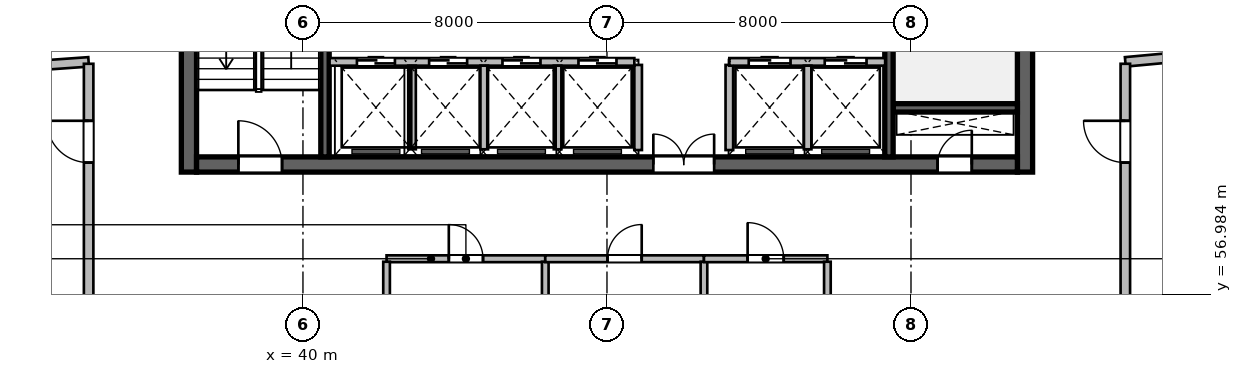
"""IFC4 building model, lengths in metres.
Left out: names, types, materials, properties, quantities, classifications, styles, units other than length and angle.
Written with IfcOpenShell. Run it as: python <this file> out.ifc"""

import sys

from ifc_helpers import new_model, si_unit, direction, frame, frame_2d, origin, place, context, subcontext, project, spatial, rectangle, extrude, source, transform, mapped, element, fill, save


model = new_model("IFC4")
c1 = context("Model", 3, precision=1e-05, world=origin(), true_north=direction((0.0, 1.0)))
c2 = subcontext(c1, "Body", "Model", "MODEL_VIEW")
j1 = project(units=[si_unit("LENGTHUNIT", "METRE"), si_unit("PLANEANGLEUNIT", "RADIAN")], contexts=[c1])
p1 = place(None, origin())
s1 = spatial("IfcSite", under=j1, at=p1, CompositionType="ELEMENT")
p2 = place(p1, origin())
s2 = spatial("IfcBuilding", under=s1, at=p2, CompositionType="ELEMENT")
p3 = place(p2, frame((0.0, 0.0, 307.8)))
s3 = spatial("IfcBuildingStorey", under=s2, at=p3, CompositionType="ELEMENT", Elevation=307.8)
m1 = source(origin(), c2, "Body", "SweptSolid", [
    extrude(rectangle(XDim=12.0, YDim=0.4, at=frame_2d((6.0, 0.0))), origin(), (0.0, 0.0, 1.0), 4.8),
])
for number, where, z_axis, x_axis in (
    (1, (37.0, 60.2, 0.0), (0.0, 0.0, 1.0), (0.0, 1.0, 0.0)),
    (2, (59.0, 60.2, 0.0), (0.0, 0.0, 1.0), (0.0, 1.0, 0.0)),
):
    element("IfcWall", number, at=place(p3, frame(where, z_axis=z_axis, x_axis=x_axis)), inside=s3, PredefinedType="SHEAR", context=c2, shape_type="MappedRepresentation", body=[
        mapped(m1, transform((0.0, 0.0, 0.0), scale=1.0)),
    ])
m2 = source(origin(), c2, "Body", "SweptSolid", [
    extrude(rectangle(XDim=21.6, YDim=0.4, at=frame_2d((10.8, 0.0))), origin(), (0.0, 0.0, 1.0), 4.8),
])
p4 = place(p3, frame((37.2, 60.4, 0.0), z_axis=(0.0, 0.0, 1.0), x_axis=(1.0, 0.0, 0.0)))
e3 = element("IfcWall", 3, at=p4, inside=s3, PredefinedType="SHEAR", context=c2, shape_type="MappedRepresentation", body=[
    mapped(m2, transform((0.0, 0.0, 0.0), scale=1.0)),
])
p5 = place(p4, frame((1.1, 0.0, 0.0)))
e4 = element("IfcOpeningElement", 4, at=p5, cuts=e3, PredefinedType="OPENING", context=c2, shape_type="SweptSolid", body=[
    extrude(rectangle(XDim=1.15, YDim=2.15, at=frame_2d((0.575, 1.075))), frame((0.0, 0.21, 0.0), z_axis=(0.0, -1.0, 0.0), x_axis=(1.0, 0.0, 0.0)), (0.0, 0.0, 1.0), 0.42),
])
p6 = place(p4, frame((19.5, 0.0, 0.0)))
e5 = element("IfcOpeningElement", 5, at=p6, cuts=e3, PredefinedType="OPENING", context=c2, shape_type="SweptSolid", body=[
    extrude(rectangle(XDim=0.9, YDim=2.1, at=frame_2d((0.45, 1.05))), frame((0.0, 0.21, 0.0), z_axis=(0.0, -1.0, 0.0), x_axis=(1.0, 0.0, 0.0)), (0.0, 0.0, 1.0), 0.42),
])
p7 = place(p4, frame((12.02, 0.0, 0.0)))
e6 = element("IfcOpeningElement", 6, at=p7, cuts=e3, PredefinedType="OPENING", context=c2, shape_type="SweptSolid", body=[
    extrude(rectangle(XDim=1.6, YDim=2.15, at=frame_2d((0.8, 1.075))), frame((0.0, 0.21, 0.0), z_axis=(0.0, -1.0, 0.0), x_axis=(1.0, 0.0, 0.0)), (0.0, 0.0, 1.0), 0.42),
])
m3 = source(origin(), c2, "Body", "SweptSolid", [
    extrude(rectangle(XDim=3.27, YDim=0.22, at=frame_2d((1.635, 0.0))), origin(), (0.0, 0.0, 1.0), 4.8),
])
p8 = place(p3, frame((55.53, 61.89, 0.0), z_axis=(0.0, 0.0, 1.0), x_axis=(1.0, 0.0, 0.0)))
e7 = element("IfcWall", 7, at=p8, inside=s3, PredefinedType="SHEAR", context=c2, shape_type="MappedRepresentation", body=[
    mapped(m3, transform((0.0, 0.0, 0.0), scale=1.0)),
])
m4 = source(origin(), c2, "Body", "SweptSolid", [
    extrude(rectangle(XDim=11.2, YDim=0.22, at=frame_2d((5.6, 0.0))), origin(), (0.0, 0.0, 1.0), 4.8),
])
p9 = place(p3, frame((40.58, 60.6, 0.0), z_axis=(0.0, 0.0, 1.0), x_axis=(0.0, 1.0, 0.0)))
e8 = element("IfcWall", 8, at=p9, inside=s3, PredefinedType="SHEAR", context=c2, shape_type="MappedRepresentation", body=[
    mapped(m4, transform((0.0, 0.0, 0.0), scale=1.0)),
])
p10 = place(p3, frame((55.42, 60.6, 0.0), z_axis=(0.0, 0.0, 1.0), x_axis=(0.0, 1.0, 0.0)))
e9 = element("IfcWall", 9, at=p10, inside=s3, PredefinedType="SHEAR", context=c2, shape_type="MappedRepresentation", body=[
    mapped(m4, transform((0.0, 0.0, 0.0), scale=1.0)),
])
p11 = place(p10, frame((9.645, 0.0, 0.0)))
e10 = element("IfcOpeningElement", 10, at=p11, cuts=e9, PredefinedType="OPENING", context=c2, shape_type="SweptSolid", body=[
    extrude(rectangle(XDim=1.15, YDim=2.15, at=frame_2d((0.575, 1.075))), frame((0.0, 0.12, 0.0), z_axis=(0.0, -1.0, 0.0), x_axis=(1.0, 0.0, 0.0)), (0.0, 0.0, 1.0), 0.24),
])
m5 = source(origin(), c2, "Body", "SweptSolid", [
    extrude(rectangle(XDim=2.24, YDim=0.2, at=frame_2d((1.12, 0.0))), origin(), (0.0, 0.0, 1.0), 4.5),
])
for number, where, z_axis, x_axis in (
    (11, (48.82, 60.78, 0.0), (0.0, 0.0, 1.0), (0.0, 1.0, 0.0)),
    (12, (51.22, 60.78, 0.0), (0.0, 0.0, 1.0), (0.0, 1.0, 0.0)),
):
    element("IfcWall", number, at=place(p3, frame(where, z_axis=z_axis, x_axis=x_axis)), inside=s3, PredefinedType="SOLIDWALL", context=c2, shape_type="MappedRepresentation", body=[
        mapped(m5, transform((0.0, 0.0, 0.0), scale=1.0)),
    ])
m6 = source(origin(), c2, "Body", "SweptSolid", [
    extrude(rectangle(XDim=8.02, YDim=0.2, at=frame_2d((4.01, 0.0))), origin(), (0.0, 0.0, 1.0), 4.5),
])
p12 = place(p3, frame((40.7, 63.1, 0.0), z_axis=(0.0, 0.0, 1.0), x_axis=(1.0, 0.0, 0.0)))
e13 = element("IfcWall", 13, at=p12, inside=s3, PredefinedType="SOLIDWALL", context=c2, shape_type="MappedRepresentation", body=[
    mapped(m6, transform((0.0, 0.0, 0.0), scale=1.0)),
])
p13 = place(p12, frame((0.72, 0.0, 0.0)))
e14 = element("IfcOpeningElement", 14, at=p13, cuts=e13, PredefinedType="OPENING", context=c2, shape_type="SweptSolid", body=[
    extrude(rectangle(XDim=1.0, YDim=2.15, at=frame_2d((0.5, 1.075))), frame((0.0, 0.11, 0.0), z_axis=(0.0, -1.0, 0.0), x_axis=(1.0, 0.0, 0.0)), (0.0, 0.0, 1.0), 0.22),
])
p14 = place(p12, frame((2.62, 0.0, 0.0)))
e15 = element("IfcOpeningElement", 15, at=p14, cuts=e13, PredefinedType="OPENING", context=c2, shape_type="SweptSolid", body=[
    extrude(rectangle(XDim=1.0, YDim=2.15, at=frame_2d((0.5, 1.075))), frame((0.0, 0.11, 0.0), z_axis=(0.0, -1.0, 0.0), x_axis=(1.0, 0.0, 0.0)), (0.0, 0.0, 1.0), 0.22),
])
p15 = place(p12, frame((4.55, 0.0, 0.0)))
e16 = element("IfcOpeningElement", 16, at=p15, cuts=e13, PredefinedType="OPENING", context=c2, shape_type="SweptSolid", body=[
    extrude(rectangle(XDim=1.0, YDim=2.15, at=frame_2d((0.5, 1.075))), frame((0.0, 0.11, 0.0), z_axis=(0.0, -1.0, 0.0), x_axis=(1.0, 0.0, 0.0)), (0.0, 0.0, 1.0), 0.22),
])
p16 = place(p12, frame((6.55, 0.0, 0.0)))
e17 = element("IfcOpeningElement", 17, at=p16, cuts=e13, PredefinedType="OPENING", context=c2, shape_type="SweptSolid", body=[
    extrude(rectangle(XDim=1.0, YDim=2.15, at=frame_2d((0.5, 1.075))), frame((0.0, 0.11, 0.0), z_axis=(0.0, -1.0, 0.0), x_axis=(1.0, 0.0, 0.0)), (0.0, 0.0, 1.0), 0.22),
])
m7 = source(origin(), c2, "Body", "SweptSolid", [
    extrude(rectangle(XDim=4.1, YDim=0.2, at=frame_2d((2.05, 0.0))), origin(), (0.0, 0.0, 1.0), 4.5),
])
p17 = place(p3, frame((51.22, 63.1, 0.0), z_axis=(0.0, 0.0, 1.0), x_axis=(1.0, 0.0, 0.0)))
e18 = element("IfcWall", 18, at=p17, inside=s3, PredefinedType="SOLIDWALL", context=c2, shape_type="MappedRepresentation", body=[
    mapped(m7, transform((0.0, 0.0, 0.0), scale=1.0)),
])
p18 = place(p17, frame((0.51, 0.0, 0.0)))
e19 = element("IfcOpeningElement", 19, at=p18, cuts=e18, PredefinedType="OPENING", context=c2, shape_type="SweptSolid", body=[
    extrude(rectangle(XDim=1.1, YDim=2.15, at=frame_2d((0.55, 1.075))), frame((0.0, 0.11, 0.0), z_axis=(0.0, -1.0, 0.0), x_axis=(1.0, 0.0, 0.0)), (0.0, 0.0, 1.0), 0.22),
])
p19 = place(p17, frame((2.51, 0.0, 0.0)))
e20 = element("IfcOpeningElement", 20, at=p19, cuts=e18, PredefinedType="OPENING", context=c2, shape_type="SweptSolid", body=[
    extrude(rectangle(XDim=1.1, YDim=2.15, at=frame_2d((0.55, 1.075))), frame((0.0, 0.11, 0.0), z_axis=(0.0, -1.0, 0.0), x_axis=(1.0, 0.0, 0.0)), (0.0, 0.0, 1.0), 0.22),
])
m8 = source(origin(), c2, "Body", "SweptSolid", [
    extrude(rectangle(XDim=2.2, YDim=0.2, at=frame_2d((1.1, 0.0))), origin(), (0.0, 0.0, 1.0), 4.5),
])
for number, where, z_axis, x_axis in (
    (21, (42.87, 60.8, 0.0), (0.0, 0.0, 1.0), (0.0, 1.0, 0.0)),
    (22, (44.77, 60.8, 0.0), (0.0, 0.0, 1.0), (0.0, 1.0, 0.0)),
    (23, (46.7, 60.8, 0.0), (0.0, 0.0, 1.0), (0.0, 1.0, 0.0)),
    (24, (53.28, 60.8, 0.0), (0.0, 0.0, 1.0), (0.0, 1.0, 0.0)),
):
    element("IfcWall", number, at=place(p3, frame(where, z_axis=z_axis, x_axis=x_axis)), inside=s3, PredefinedType="SOLIDWALL", context=c2, shape_type="MappedRepresentation", body=[
        mapped(m8, transform((0.0, 0.0, 0.0), scale=1.0)),
    ])
m9 = source(origin(), c2, "Body", "SweptSolid", [
    extrude(rectangle(XDim=4.176, YDim=0.18, at=frame_2d((2.088, 0.0))), origin(), (0.0, 0.0, 1.0), 4.5),
])
p20 = place(p3, frame((42.2, 57.92, 0.0), z_axis=(0.0, 0.0, 1.0), x_axis=(1.0, 0.0, 0.0)))
e25 = element("IfcWall", 25, at=p20, inside=s3, PredefinedType="PLUMBINGWALL", context=c2, shape_type="MappedRepresentation", body=[
    mapped(m9, transform((0.0, 0.0, 0.0), scale=1.0)),
])
p21 = place(p20, frame((1.638, 0.0, 0.0)))
e26 = element("IfcOpeningElement", 26, at=p21, cuts=e25, PredefinedType="OPENING", context=c2, shape_type="SweptSolid", body=[
    extrude(rectangle(XDim=0.9, YDim=2.08, at=frame_2d((0.45, 1.04))), frame((0.0, 0.1, 0.0), z_axis=(0.0, -1.0, 0.0), x_axis=(1.0, 0.0, 0.0)), (0.0, 0.0, 1.0), 0.2),
])
m10 = source(origin(), c2, "Body", "SweptSolid", [
    extrude(rectangle(XDim=3.763, YDim=0.175, at=frame_2d((1.881, 0.0))), origin(), (0.0, 0.0, 1.0), 4.5),
])
for number, where, z_axis, x_axis in (
    (27, (42.2, 54.079, 0.0), (0.0, 0.0, 1.0), (0.0, 1.0, 0.0)),
    (28, (46.376, 54.079, 0.0), (0.0, 0.0, 1.0), (0.0, 1.0, 0.0)),
):
    element("IfcWall", number, at=place(p3, frame(where, z_axis=z_axis, x_axis=x_axis)), inside=s3, PredefinedType="PARTITIONING", context=c2, shape_type="MappedRepresentation", body=[
        mapped(m10, transform((0.0, 0.0, 0.0), scale=1.0)),
    ])
p22 = place(p3, frame((46.376, 57.92, 0.0), z_axis=(0.0, 0.0, 1.0), x_axis=(1.0, 0.0, 0.0)))
e29 = element("IfcWall", 29, at=p22, inside=s3, PredefinedType="PLUMBINGWALL", context=c2, shape_type="MappedRepresentation", body=[
    mapped(m9, transform((0.0, 0.0, 0.0), scale=1.0)),
])
p23 = place(p22, frame((1.638, 0.0, 0.0)))
e30 = element("IfcOpeningElement", 30, at=p23, cuts=e29, PredefinedType="OPENING", context=c2, shape_type="SweptSolid", body=[
    extrude(rectangle(XDim=0.9, YDim=2.08, at=frame_2d((0.45, 1.04))), frame((0.0, 0.1, 0.0), z_axis=(0.0, -1.0, 0.0), x_axis=(1.0, 0.0, 0.0)), (0.0, 0.0, 1.0), 0.2),
])
p24 = place(p3, frame((50.552, 54.079, 0.0), z_axis=(0.0, 0.0, 1.0), x_axis=(0.0, 1.0, 0.0)))
e31 = element("IfcWall", 31, at=p24, inside=s3, PredefinedType="PARTITIONING", context=c2, shape_type="MappedRepresentation", body=[
    mapped(m10, transform((0.0, 0.0, 0.0), scale=1.0)),
])
m11 = source(origin(), c2, "Body", "SweptSolid", [
    extrude(rectangle(XDim=3.248, YDim=0.18, at=frame_2d((1.624, 0.0))), origin(), (0.0, 0.0, 1.0), 4.5),
])
p25 = place(p3, frame((50.552, 57.92, 0.0), z_axis=(0.0, 0.0, 1.0), x_axis=(1.0, 0.0, 0.0)))
e32 = element("IfcWall", 32, at=p25, inside=s3, PredefinedType="PLUMBINGWALL", context=c2, shape_type="MappedRepresentation", body=[
    mapped(m11, transform((0.0, 0.0, 0.0), scale=1.0)),
])
p26 = place(p25, frame((1.149, 0.0, 0.0)))
e33 = element("IfcOpeningElement", 33, at=p26, cuts=e32, PredefinedType="OPENING", context=c2, shape_type="SweptSolid", body=[
    extrude(rectangle(XDim=0.95, YDim=2.12, at=frame_2d((0.475, 1.06))), frame((0.0, 0.1, 0.0), z_axis=(0.0, -1.0, 0.0), x_axis=(1.0, 0.0, 0.0)), (0.0, 0.0, 1.0), 0.2),
])
p27 = place(p3, frame((53.8, 54.079, 0.0), z_axis=(0.0, 0.0, 1.0), x_axis=(0.0, 1.0, 0.0)))
e34 = element("IfcWall", 34, at=p27, inside=s3, PredefinedType="PARTITIONING", context=c2, shape_type="MappedRepresentation", body=[
    mapped(m10, transform((0.0, 0.0, 0.0), scale=1.0)),
])
m12 = source(origin(), c2, "Body", "SweptSolid", [
    extrude(rectangle(XDim=13.864, YDim=0.25, at=frame_2d((6.932, 0.0))), origin(), (0.0, 0.0, 1.0), 4.5),
])
p28 = place(p3, frame((20.531, 62.115, 0.0), z_axis=(0.0, 0.0, 1.0), x_axis=(0.997472447014, 0.071054327443, 0.0)))
e35 = element("IfcWall", 35, at=p28, inside=s3, PredefinedType="PARTITIONING", context=c2, shape_type="MappedRepresentation", body=[
    mapped(m12, transform((0.0, 0.0, 0.0), scale=1.0)),
])
m13 = source(origin(), c2, "Body", "SweptSolid", [
    extrude(rectangle(XDim=15.081, YDim=0.25, at=frame_2d((7.541, 0.0))), origin(), (0.0, 0.0, 1.0), 4.5),
])
p29 = place(p3, frame((34.36, 47.969, 0.0), z_axis=(0.0, 0.0, 1.0), x_axis=(0.0, 1.0, 0.0)))
e36 = element("IfcWall", 36, at=p29, inside=s3, PredefinedType="PARTITIONING", context=c2, shape_type="MappedRepresentation", body=[
    mapped(m13, transform((0.0, 0.0, 0.0), scale=1.0)),
])
p30 = place(p29, frame((12.481, 0.0, 0.0)))
e37 = element("IfcOpeningElement", 37, at=p30, cuts=e36, PredefinedType="OPENING", context=c2, shape_type="SweptSolid", body=[
    extrude(rectangle(XDim=1.1, YDim=2.15, at=frame_2d((0.55, 1.075))), frame((0.0, 0.135, 0.0), z_axis=(0.0, -1.0, 0.0), x_axis=(1.0, 0.0, 0.0)), (0.0, 0.0, 1.0), 0.27),
])
m14 = source(origin(), c2, "Body", "SweptSolid", [
    extrude(rectangle(XDim=11.788, YDim=0.25, at=frame_2d((5.894, 0.0))), origin(), (0.0, 0.0, 1.0), 4.5),
])
p31 = place(p3, frame((61.64, 63.1, 0.0), z_axis=(0.0, 0.0, 1.0), x_axis=(0.995763003616, 0.091956732379, 0.0)))
e38 = element("IfcWall", 38, at=p31, inside=s3, PredefinedType="PARTITIONING", context=c2, shape_type="MappedRepresentation", body=[
    mapped(m14, transform((0.0, 0.0, 0.0), scale=1.0)),
])
m15 = source(origin(), c2, "Body", "SweptSolid", [
    extrude(rectangle(XDim=14.581, YDim=0.25, at=frame_2d((7.291, 0.0))), origin(), (0.0, 0.0, 1.0), 4.174),
])
p32 = place(p3, frame((61.64, 48.469, 0.0), z_axis=(0.0, 0.0, 1.0), x_axis=(0.0, 1.0, 0.0)))
e39 = element("IfcWall", 39, at=p32, inside=s3, PredefinedType="PARTITIONING", context=c2, shape_type="MappedRepresentation", body=[
    mapped(m15, transform((0.0, 0.0, 0.0), scale=1.0)),
])
p33 = place(p32, frame((11.981, 0.0, 0.0)))
e40 = element("IfcOpeningElement", 40, at=p33, cuts=e39, PredefinedType="OPENING", context=c2, shape_type="SweptSolid", body=[
    extrude(rectangle(XDim=1.1, YDim=2.15, at=frame_2d((0.55, 1.075))), frame((0.0, 0.135, 0.0), z_axis=(0.0, -1.0, 0.0), x_axis=(1.0, 0.0, 0.0)), (0.0, 0.0, 1.0), 0.27),
])
m16 = source(origin(), c2, "Body", "SweptSolid", [
    extrude(rectangle(XDim=1.15, YDim=2.15, at=frame_2d((0.575, 1.075))), frame((0.0, 0.025, 0.0), z_axis=(0.0, -1.0, 0.0), x_axis=(1.0, 0.0, 0.0)), (0.0, 0.0, 1.0), 0.05),
])
p34 = place(p5, origin())
e41 = element("IfcDoor", 41, at=p34, inside=s3, OperationType="SINGLE_SWING_LEFT", PredefinedType="DOOR", context=c2, shape_type="MappedRepresentation", body=[
    mapped(m16, transform((0.0, 0.0, 0.0), scale=1.0)),
])
fill(e4, e41)
m17 = source(origin(), c2, "Body", "SweptSolid", [
    extrude(rectangle(XDim=0.9, YDim=2.1, at=frame_2d((0.45, 1.05))), frame((0.0, 0.025, 0.0), z_axis=(0.0, -1.0, 0.0), x_axis=(1.0, 0.0, 0.0)), (0.0, 0.0, 1.0), 0.05),
])
p35 = place(p6, origin())
e42 = element("IfcDoor", 42, at=p35, inside=s3, OperationType="SINGLE_SWING_RIGHT", PredefinedType="DOOR", context=c2, shape_type="MappedRepresentation", body=[
    mapped(m17, transform((0.0, 0.0, 0.0), scale=1.0)),
])
fill(e5, e42)
m18 = source(origin(), c2, "Body", "SweptSolid", [
    extrude(rectangle(XDim=1.6, YDim=2.15, at=frame_2d((0.8, 1.075))), frame((0.0, 0.025, 0.0), z_axis=(0.0, -1.0, 0.0), x_axis=(1.0, 0.0, 0.0)), (0.0, 0.0, 1.0), 0.05),
])
p36 = place(p7, origin())
e43 = element("IfcDoor", 43, at=p36, inside=s3, OperationType="DOUBLE_DOOR_SINGLE_SWING", PredefinedType="DOOR", context=c2, shape_type="MappedRepresentation", body=[
    mapped(m18, transform((0.0, 0.0, 0.0), scale=1.0)),
])
fill(e6, e43)
m19 = source(origin(), c2, "Body", "SweptSolid", [
    extrude(rectangle(XDim=1.0, YDim=2.15, at=frame_2d((0.5, 1.075))), frame((0.0, 0.025, 0.0), z_axis=(0.0, -1.0, 0.0), x_axis=(1.0, 0.0, 0.0)), (0.0, 0.0, 1.0), 0.05),
])
p37 = place(p13, origin())
e44 = element("IfcDoor", 44, at=p37, inside=s3, OperationType="DOUBLE_DOOR_SLIDING", PredefinedType="DOOR", context=c2, shape_type="MappedRepresentation", body=[
    mapped(m19, transform((0.0, 0.0, 0.0), scale=1.0)),
])
fill(e14, e44)
p38 = place(p14, origin())
e45 = element("IfcDoor", 45, at=p38, inside=s3, OperationType="DOUBLE_DOOR_SLIDING", PredefinedType="DOOR", context=c2, shape_type="MappedRepresentation", body=[
    mapped(m19, transform((0.0, 0.0, 0.0), scale=1.0)),
])
fill(e15, e45)
p39 = place(p15, origin())
e46 = element("IfcDoor", 46, at=p39, inside=s3, OperationType="DOUBLE_DOOR_SLIDING", PredefinedType="DOOR", context=c2, shape_type="MappedRepresentation", body=[
    mapped(m19, transform((0.0, 0.0, 0.0), scale=1.0)),
])
fill(e16, e46)
p40 = place(p16, origin())
e47 = element("IfcDoor", 47, at=p40, inside=s3, OperationType="DOUBLE_DOOR_SLIDING", PredefinedType="DOOR", context=c2, shape_type="MappedRepresentation", body=[
    mapped(m19, transform((0.0, 0.0, 0.0), scale=1.0)),
])
fill(e17, e47)
m20 = source(origin(), c2, "Body", "SweptSolid", [
    extrude(rectangle(XDim=1.1, YDim=2.15, at=frame_2d((0.55, 1.075))), frame((0.0, 0.025, 0.0), z_axis=(0.0, -1.0, 0.0), x_axis=(1.0, 0.0, 0.0)), (0.0, 0.0, 1.0), 0.05),
])
p41 = place(p18, origin())
e48 = element("IfcDoor", 48, at=p41, inside=s3, OperationType="DOUBLE_DOOR_SLIDING", PredefinedType="DOOR", context=c2, shape_type="MappedRepresentation", body=[
    mapped(m20, transform((0.0, 0.0, 0.0), scale=1.0)),
])
fill(e19, e48)
p42 = place(p19, origin())
e49 = element("IfcDoor", 49, at=p42, inside=s3, OperationType="DOUBLE_DOOR_SLIDING", PredefinedType="DOOR", context=c2, shape_type="MappedRepresentation", body=[
    mapped(m20, transform((0.0, 0.0, 0.0), scale=1.0)),
])
fill(e20, e49)
m21 = source(origin(), c2, "Body", "SweptSolid", [
    extrude(rectangle(XDim=0.9, YDim=2.08, at=frame_2d((0.45, 1.04))), frame((0.0, 0.025, 0.0), z_axis=(0.0, -1.0, 0.0), x_axis=(1.0, 0.0, 0.0)), (0.0, 0.0, 1.0), 0.05),
])
p43 = place(p21, origin())
e50 = element("IfcDoor", 50, at=p43, inside=s3, OperationType="SINGLE_SWING_LEFT", PredefinedType="DOOR", context=c2, shape_type="MappedRepresentation", body=[
    mapped(m21, transform((0.0, 0.0, 0.0), scale=1.0)),
])
fill(e26, e50)
p44 = place(p23, origin())
e51 = element("IfcDoor", 51, at=p44, inside=s3, OperationType="SINGLE_SWING_RIGHT", PredefinedType="DOOR", context=c2, shape_type="MappedRepresentation", body=[
    mapped(m21, transform((0.0, 0.0, 0.0), scale=1.0)),
])
fill(e30, e51)
m22 = source(origin(), c2, "Body", "SweptSolid", [
    extrude(rectangle(XDim=0.95, YDim=2.12, at=frame_2d((0.475, 1.06))), frame((0.0, 0.025, 0.0), z_axis=(0.0, -1.0, 0.0), x_axis=(1.0, 0.0, 0.0)), (0.0, 0.0, 1.0), 0.05),
])
p45 = place(p26, origin())
e52 = element("IfcDoor", 52, at=p45, inside=s3, OperationType="SINGLE_SWING_LEFT", PredefinedType="DOOR", context=c2, shape_type="MappedRepresentation", body=[
    mapped(m22, transform((0.0, 0.0, 0.0), scale=1.0)),
])
fill(e33, e52)
m23 = source(origin(), c2, "Body", "SweptSolid", [
    extrude(rectangle(XDim=1.1, YDim=2.15, at=frame_2d((0.55, 1.075))), frame((0.0, 0.025, 0.0), z_axis=(0.0, -1.0, 0.0), x_axis=(1.0, 0.0, 0.0)), (0.0, 0.0, 1.0), 0.05),
])
p46 = place(p30, origin())
e53 = element("IfcDoor", 53, at=p46, inside=s3, OperationType="SINGLE_SWING_RIGHT", PredefinedType="DOOR", context=c2, shape_type="MappedRepresentation", body=[
    mapped(m23, transform((0.0, 0.0, 0.0), scale=1.0)),
])
fill(e37, e53)
p47 = place(p33, origin())
e54 = element("IfcDoor", 54, at=p47, inside=s3, OperationType="SINGLE_SWING_RIGHT", PredefinedType="DOOR", context=c2, shape_type="MappedRepresentation", body=[
    mapped(m23, transform((0.0, 0.0, 0.0), scale=1.0)),
])
fill(e40, e54)
save(model, sys.argv[1])
